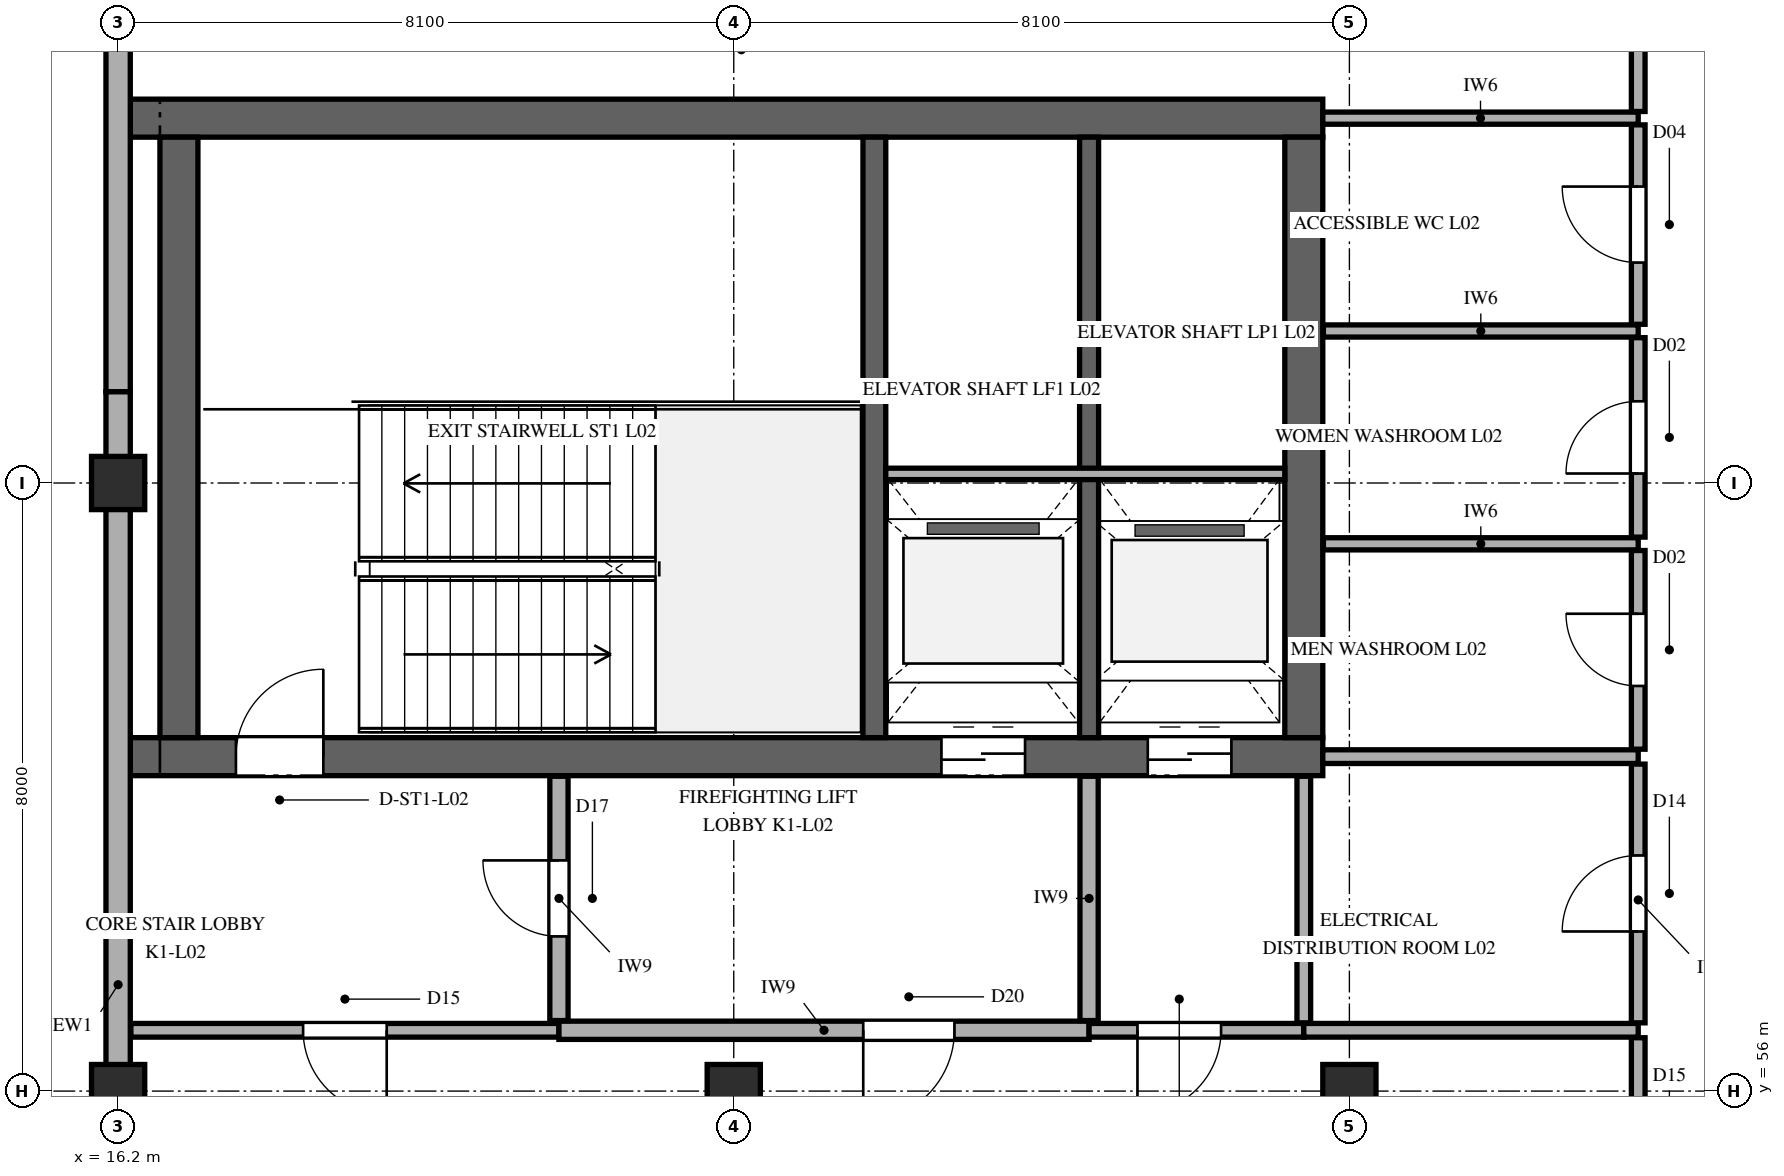
"""IFC4 building model, lengths in metres.
Left out: names, types, materials, properties, quantities, classifications, styles, units other than length and angle.
Written with IfcOpenShell. Run it as: python <this file> out.ifc"""

import sys

from ifc_helpers import new_model, si_unit, direction, frame, frame_2d, origin, origin_2d, place, context, subcontext, project, spatial, rectangle, extrude, element, fill, save


model = new_model("IFC4")
c1 = context("Model", 3, precision=1e-05, world=origin(), true_north=direction((0.0, 1.0)))
c2 = subcontext(c1, "Body", "Model", "MODEL_VIEW")
j1 = project(units=[si_unit("LENGTHUNIT", "METRE"), si_unit("PLANEANGLEUNIT", "RADIAN")], contexts=[c1])
p1 = place(None, origin())
s1 = spatial("IfcSite", under=j1, at=p1, CompositionType="ELEMENT")
p2 = place(p1, origin())
s2 = spatial("IfcBuilding", under=s1, at=p2, CompositionType="ELEMENT")
p3 = place(p2, frame((0.0, 0.0, 10.2)))
s3 = spatial("IfcBuildingStorey", under=s2, at=p3, CompositionType="ELEMENT", Elevation=10.2)
p4 = place(p3, frame((16.36, 60.4, 0.0), z_axis=(0.0, 0.0, 1.0), x_axis=(1.0, 0.0, 0.0)))
e1 = element("IfcWall", 1, at=p4, inside=s3, PredefinedType="SHEAR", context=c2, shape_type="SweptSolid", body=[
    extrude(rectangle(XDim=15.69, YDim=0.5, at=frame_2d((7.845, 0.0))), origin(), (0.0, 0.0, 1.0), 4.5),
])
p5 = place(p4, frame((1.39, 0.0, 0.0)))
e2 = element("IfcOpeningElement", 2, at=p5, cuts=e1, PredefinedType="OPENING", context=c2, shape_type="SweptSolid", body=[
    extrude(rectangle(XDim=1.15, YDim=2.25, at=frame_2d((0.575, 1.125))), frame((0.0, 0.26, 0.0), z_axis=(0.0, -1.0, 0.0), x_axis=(1.0, 0.0, 0.0)), (0.0, 0.0, 1.0), 0.52),
])
p6 = place(p4, frame((10.673, 0.0, 0.0)))
e3 = element("IfcOpeningElement", 3, at=p6, cuts=e1, PredefinedType="OPENING", context=c2, shape_type="SweptSolid", body=[
    extrude(rectangle(XDim=1.1, YDim=2.2, at=frame_2d((0.55, 1.1))), frame((0.0, 0.26, 0.0), z_axis=(0.0, -1.0, 0.0), x_axis=(1.0, 0.0, 0.0)), (0.0, 0.0, 1.0), 0.52),
])
p7 = place(p4, frame((13.387, 0.0, 0.0)))
e4 = element("IfcOpeningElement", 4, at=p7, cuts=e1, PredefinedType="OPENING", context=c2, shape_type="SweptSolid", body=[
    extrude(rectangle(XDim=1.1, YDim=2.2, at=frame_2d((0.55, 1.1))), frame((0.0, 0.26, 0.0), z_axis=(0.0, -1.0, 0.0), x_axis=(1.0, 0.0, 0.0)), (0.0, 0.0, 1.0), 0.52),
])
p8 = place(p3, frame((16.36, 68.8, 0.0), z_axis=(0.0, 0.0, 1.0), x_axis=(1.0, 0.0, 0.0)))
e5 = element("IfcWall", 5, at=p8, inside=s3, PredefinedType="SHEAR", context=c2, shape_type="SweptSolid", body=[
    extrude(rectangle(XDim=15.69, YDim=0.5, at=frame_2d((7.845, 0.0))), origin(), (0.0, 0.0, 1.0), 4.5),
])
for number, where, z_axis, x_axis in (
    (6, (17.0, 60.65, 0.0), (0.0, 0.0, 1.0), (0.0, 1.0, 0.0)),
    (7, (31.8, 60.65, 0.0), (0.0, 0.0, 1.0), (0.0, 1.0, 0.0)),
):
    element("IfcWall", number, at=place(p3, frame(where, z_axis=z_axis, x_axis=x_axis)), inside=s3, PredefinedType="SHEAR", context=c2, shape_type="SweptSolid", body=[
        extrude(rectangle(XDim=7.9, YDim=0.5, at=frame_2d((3.95, 0.0))), origin(), (0.0, 0.0, 1.0), 4.5),
    ])
p9 = place(p3, frame((26.15, 60.65, 0.0), z_axis=(0.0, 0.0, 1.0), x_axis=(0.0, 1.0, 0.0)))
e8 = element("IfcWall", 8, at=p9, inside=s3, PredefinedType="SHEAR", context=c2, shape_type="SweptSolid", body=[
    extrude(rectangle(XDim=7.9, YDim=0.3, at=frame_2d((3.95, 0.0))), origin(), (0.0, 0.0, 1.0), 4.5),
])
p10 = place(p3, frame((28.975, 60.65, 0.0), z_axis=(0.0, 0.0, 1.0), x_axis=(0.0, 1.0, 0.0)))
e9 = element("IfcWall", 9, at=p10, inside=s3, PredefinedType="SHEAR", context=c2, shape_type="SweptSolid", body=[
    extrude(rectangle(XDim=7.9, YDim=0.25, at=frame_2d((3.95, 0.0))), origin(), (0.0, 0.0, 1.0), 4.5),
])
for number, where, z_axis, x_axis in (
    (10, (16.2, 56.0, 0.0), (0.0, 0.0, 1.0), (1.0, 0.0, 0.0)),
    (11, (16.2, 64.0, 0.0), (0.0, 0.0, 1.0), (1.0, 0.0, 0.0)),
    (12, (24.3, 56.0, 0.0), (0.0, 0.0, 1.0), (1.0, 0.0, 0.0)),
    (13, (32.4, 56.0, 0.0), (0.0, 0.0, 1.0), (1.0, 0.0, 0.0)),
):
    element("IfcColumn", number, at=place(p3, frame(where, z_axis=z_axis, x_axis=x_axis)), inside=s3, PredefinedType="COLUMN", context=c2, shape_type="SweptSolid", body=[
        extrude(rectangle(XDim=0.7, YDim=0.7, at=origin_2d()), origin(), (0.0, 0.0, 1.0), 4.5),
    ])
p11 = place(p3, frame((16.2, 80.8, 0.0), z_axis=(0.0, 0.0, 1.0), x_axis=(0.0, -1.0, 0.0)))
e14 = element("IfcWall", 14, at=p11, inside=s3, PredefinedType="SOLIDWALL", context=c2, shape_type="SweptSolid", body=[
    extrude(rectangle(XDim=15.6, YDim=0.32, at=frame_2d((7.8, 0.0))), origin(), (0.0, 0.0, 1.0), 3.732),
])
p12 = place(p11, frame((4.5, 0.0, 0.95)))
e15 = element("IfcOpeningElement", 15, at=p12, cuts=e14, PredefinedType="OPENING", context=c2, shape_type="SweptSolid", body=[
    extrude(rectangle(XDim=1.8, YDim=1.8, at=frame_2d((0.9, 0.9))), frame((0.0, 0.17, 0.0), z_axis=(0.0, -1.0, 0.0), x_axis=(1.0, 0.0, 0.0)), (0.0, 0.0, 1.0), 0.34),
])
p13 = place(p3, frame((16.2, 65.2, 0.0), z_axis=(0.0, 0.0, 1.0), x_axis=(0.0, -1.0, 0.0)))
e16 = element("IfcWall", 16, at=p13, inside=s3, PredefinedType="SOLIDWALL", context=c2, shape_type="SweptSolid", body=[
    extrude(rectangle(XDim=15.6, YDim=0.32, at=frame_2d((7.8, 0.0))), origin(), (0.0, 0.0, 1.0), 3.732),
])
p14 = place(p3, frame((26.3, 64.12, 0.0), z_axis=(0.0, 0.0, 1.0), x_axis=(1.0, 0.0, 0.0)))
e17 = element("IfcWall", 17, at=p14, inside=s3, PredefinedType="PARTITIONING", context=c2, shape_type="SweptSolid", body=[
    extrude(rectangle(XDim=5.25, YDim=0.15, at=frame_2d((2.625, 0.0))), origin(), (0.0, 0.0, 1.0), 4.24),
])
p15 = place(p3, frame((16.368, 56.8, 0.0), z_axis=(0.0, 0.0, 1.0), x_axis=(1.0, 0.0, 0.0)))
e18 = element("IfcWall", 18, at=p15, inside=s3, PredefinedType="PARTITIONING", context=c2, shape_type="SweptSolid", body=[
    extrude(rectangle(XDim=5.632, YDim=0.18, at=frame_2d((2.816, 0.0))), origin(), (0.0, 0.0, 1.0), 4.24),
])
p16 = place(p15, frame((2.266, 0.0, 0.0)))
e19 = element("IfcOpeningElement", 19, at=p16, cuts=e18, PredefinedType="OPENING", context=c2, shape_type="SweptSolid", body=[
    extrude(rectangle(XDim=1.1, YDim=2.2, at=frame_2d((0.55, 1.1))), frame((0.0, 0.1, 0.0), z_axis=(0.0, -1.0, 0.0), x_axis=(1.0, 0.0, 0.0)), (0.0, 0.0, 1.0), 0.2),
])
p17 = place(p3, frame((22.0, 56.8, 0.0), z_axis=(0.0, 0.0, 1.0), x_axis=(1.0, 0.0, 0.0)))
e20 = element("IfcWall", 20, at=p17, inside=s3, PredefinedType="PARTITIONING", context=c2, shape_type="SweptSolid", body=[
    extrude(rectangle(XDim=6.975, YDim=0.24, at=frame_2d((3.488, 0.0))), origin(), (0.0, 0.0, 1.0), 4.24),
])
p18 = place(p17, frame((4.003, 0.0, 0.0)))
e21 = element("IfcOpeningElement", 21, at=p18, cuts=e20, PredefinedType="OPENING", context=c2, shape_type="SweptSolid", body=[
    extrude(rectangle(XDim=1.2, YDim=2.3, at=frame_2d((0.6, 1.15))), frame((0.0, 0.13, 0.0), z_axis=(0.0, -1.0, 0.0), x_axis=(1.0, 0.0, 0.0)), (0.0, 0.0, 1.0), 0.26),
])
p19 = place(p3, frame((28.975, 56.8, 0.0), z_axis=(0.0, 0.0, 1.0), x_axis=(1.0, 0.0, 0.0)))
e22 = element("IfcWall", 22, at=p19, inside=s3, PredefinedType="PARTITIONING", context=c2, shape_type="SweptSolid", body=[
    extrude(rectangle(XDim=2.825, YDim=0.18, at=frame_2d((1.413, 0.0))), origin(), (0.0, 0.0, 1.0), 4.24),
])
p20 = place(p19, frame((0.636, 0.0, 0.0)))
e23 = element("IfcOpeningElement", 23, at=p20, cuts=e22, PredefinedType="OPENING", context=c2, shape_type="SweptSolid", body=[
    extrude(rectangle(XDim=1.1, YDim=2.2, at=frame_2d((0.55, 1.1))), frame((0.0, 0.1, 0.0), z_axis=(0.0, -1.0, 0.0), x_axis=(1.0, 0.0, 0.0)), (0.0, 0.0, 1.0), 0.2),
])
p21 = place(p3, frame((31.8, 56.8, 0.0), z_axis=(0.0, 0.0, 1.0), x_axis=(1.0, 0.0, 0.0)))
e24 = element("IfcWall", 24, at=p21, inside=s3, PredefinedType="PARTITIONING", context=c2, shape_type="SweptSolid", body=[
    extrude(rectangle(XDim=4.4, YDim=0.18, at=frame_2d((2.2, 0.0))), origin(), (0.0, 0.0, 1.0), 4.24),
])
p22 = place(p3, frame((32.05, 60.4, 0.0), z_axis=(0.0, 0.0, 1.0), x_axis=(1.0, 0.0, 0.0)))
e25 = element("IfcWall", 25, at=p22, inside=s3, PredefinedType="PARTITIONING", context=c2, shape_type="SweptSolid", body=[
    extrude(rectangle(XDim=4.15, YDim=0.18, at=frame_2d((2.075, 0.0))), origin(), (0.0, 0.0, 1.0), 4.24),
])
for number, where, z_axis, x_axis in (
    (26, (32.058, 63.2, 0.0), (0.0, 0.0, 1.0), (1.0, 0.0, 0.0)),
    (27, (32.058, 66.0, 0.0), (0.0, 0.0, 1.0), (1.0, 0.0, 0.0)),
):
    element("IfcWall", number, at=place(p3, frame(where, z_axis=z_axis, x_axis=x_axis)), inside=s3, PredefinedType="PARTITIONING", context=c2, shape_type="SweptSolid", body=[
        extrude(rectangle(XDim=4.142, YDim=0.16, at=frame_2d((2.071, 0.0))), origin(), (0.0, 0.0, 1.0), 4.24),
    ])
p23 = place(p3, frame((32.05, 68.8, 0.0), z_axis=(0.0, 0.0, 1.0), x_axis=(1.0, 0.0, 0.0)))
e28 = element("IfcWall", 28, at=p23, inside=s3, PredefinedType="PARTITIONING", context=c2, shape_type="SweptSolid", body=[
    extrude(rectangle(XDim=4.15, YDim=0.16, at=frame_2d((2.075, 0.0))), origin(), (0.0, 0.0, 1.0), 4.24),
])
p24 = place(p3, frame((22.0, 56.928, 0.0), z_axis=(0.0, 0.0, 1.0), x_axis=(0.0, 1.0, 0.0)))
e29 = element("IfcWall", 29, at=p24, inside=s3, PredefinedType="PARTITIONING", context=c2, shape_type="SweptSolid", body=[
    extrude(rectangle(XDim=3.214, YDim=0.24, at=frame_2d((1.607, 0.0))), origin(), (0.0, 0.0, 1.0), 4.24),
])
p25 = place(p24, frame((1.107, 0.0, 0.0)))
e30 = element("IfcOpeningElement", 30, at=p25, cuts=e29, PredefinedType="OPENING", context=c2, shape_type="SweptSolid", body=[
    extrude(rectangle(XDim=1.0, YDim=2.2, at=frame_2d((0.5, 1.1))), frame((0.0, 0.13, 0.0), z_axis=(0.0, -1.0, 0.0), x_axis=(1.0, 0.0, 0.0)), (0.0, 0.0, 1.0), 0.26),
])
p26 = place(p3, frame((28.975, 56.928, 0.0), z_axis=(0.0, 0.0, 1.0), x_axis=(0.0, 1.0, 0.0)))
e31 = element("IfcWall", 31, at=p26, inside=s3, PredefinedType="PARTITIONING", context=c2, shape_type="SweptSolid", body=[
    extrude(rectangle(XDim=3.214, YDim=0.24, at=frame_2d((1.607, 0.0))), origin(), (0.0, 0.0, 1.0), 4.24),
])
p27 = place(p3, frame((31.8, 56.898, 0.0), z_axis=(0.0, 0.0, 1.0), x_axis=(0.0, 1.0, 0.0)))
e32 = element("IfcWall", 32, at=p27, inside=s3, PredefinedType="PARTITIONING", context=c2, shape_type="SweptSolid", body=[
    extrude(rectangle(XDim=3.244, YDim=0.18, at=frame_2d((1.622, 0.0))), origin(), (0.0, 0.0, 1.0), 4.24),
])
p28 = place(p3, frame((36.2, 53.298, 0.0), z_axis=(0.0, 0.0, 1.0), x_axis=(0.0, 1.0, 0.0)))
e33 = element("IfcWall", 33, at=p28, inside=s3, PredefinedType="PARTITIONING", context=c2, shape_type="SweptSolid", body=[
    extrude(rectangle(XDim=3.404, YDim=0.18, at=frame_2d((1.702, 0.0))), origin(), (0.0, 0.0, 1.0), 3.825),
])
p29 = place(p28, frame((1.152, 0.0, 0.0)))
e34 = element("IfcOpeningElement", 34, at=p29, cuts=e33, PredefinedType="OPENING", context=c2, shape_type="SweptSolid", body=[
    extrude(rectangle(XDim=1.1, YDim=2.2, at=frame_2d((0.55, 1.1))), frame((0.0, 0.1, 0.0), z_axis=(0.0, -1.0, 0.0), x_axis=(1.0, 0.0, 0.0)), (0.0, 0.0, 1.0), 0.2),
])
p30 = place(p3, frame((36.2, 56.898, 0.0), z_axis=(0.0, 0.0, 1.0), x_axis=(0.0, 1.0, 0.0)))
e35 = element("IfcWall", 35, at=p30, inside=s3, PredefinedType="PARTITIONING", context=c2, shape_type="SweptSolid", body=[
    extrude(rectangle(XDim=3.404, YDim=0.18, at=frame_2d((1.702, 0.0))), origin(), (0.0, 0.0, 1.0), 4.24),
])
p31 = place(p30, frame((1.202, 0.0, 0.0)))
e36 = element("IfcOpeningElement", 36, at=p31, cuts=e35, PredefinedType="OPENING", context=c2, shape_type="SweptSolid", body=[
    extrude(rectangle(XDim=1.0, YDim=2.15, at=frame_2d((0.5, 1.075))), frame((0.0, 0.1, 0.0), z_axis=(0.0, -1.0, 0.0), x_axis=(1.0, 0.0, 0.0)), (0.0, 0.0, 1.0), 0.2),
])
p32 = place(p3, frame((36.2, 60.498, 0.0), z_axis=(0.0, 0.0, 1.0), x_axis=(0.0, 1.0, 0.0)))
e37 = element("IfcWall", 37, at=p32, inside=s3, PredefinedType="PARTITIONING", context=c2, shape_type="SweptSolid", body=[
    extrude(rectangle(XDim=2.614, YDim=0.18, at=frame_2d((1.307, 0.0))), origin(), (0.0, 0.0, 1.0), 4.24),
])
p33 = place(p32, frame((0.832, 0.0, 0.0)))
e38 = element("IfcOpeningElement", 38, at=p33, cuts=e37, PredefinedType="OPENING", context=c2, shape_type="SweptSolid", body=[
    extrude(rectangle(XDim=0.95, YDim=2.1, at=frame_2d((0.475, 1.05))), frame((0.0, 0.1, 0.0), z_axis=(0.0, -1.0, 0.0), x_axis=(1.0, 0.0, 0.0)), (0.0, 0.0, 1.0), 0.2),
])
p34 = place(p3, frame((36.2, 63.288, 0.0), z_axis=(0.0, 0.0, 1.0), x_axis=(0.0, 1.0, 0.0)))
e39 = element("IfcWall", 39, at=p34, inside=s3, PredefinedType="PARTITIONING", context=c2, shape_type="SweptSolid", body=[
    extrude(rectangle(XDim=2.624, YDim=0.18, at=frame_2d((1.312, 0.0))), origin(), (0.0, 0.0, 1.0), 4.24),
])
p35 = place(p34, frame((0.837, 0.0, 0.0)))
e40 = element("IfcOpeningElement", 40, at=p35, cuts=e39, PredefinedType="OPENING", context=c2, shape_type="SweptSolid", body=[
    extrude(rectangle(XDim=0.95, YDim=2.1, at=frame_2d((0.475, 1.05))), frame((0.0, 0.1, 0.0), z_axis=(0.0, -1.0, 0.0), x_axis=(1.0, 0.0, 0.0)), (0.0, 0.0, 1.0), 0.2),
])
p36 = place(p3, frame((36.2, 66.088, 0.0), z_axis=(0.0, 0.0, 1.0), x_axis=(0.0, 1.0, 0.0)))
e41 = element("IfcWall", 41, at=p36, inside=s3, PredefinedType="PARTITIONING", context=c2, shape_type="SweptSolid", body=[
    extrude(rectangle(XDim=2.624, YDim=0.18, at=frame_2d((1.312, 0.0))), origin(), (0.0, 0.0, 1.0), 4.24),
])
p37 = place(p36, frame((0.812, 0.0, 0.0)))
e42 = element("IfcOpeningElement", 42, at=p37, cuts=e41, PredefinedType="OPENING", context=c2, shape_type="SweptSolid", body=[
    extrude(rectangle(XDim=1.0, YDim=2.15, at=frame_2d((0.5, 1.075))), frame((0.0, 0.1, 0.0), z_axis=(0.0, -1.0, 0.0), x_axis=(1.0, 0.0, 0.0)), (0.0, 0.0, 1.0), 0.2),
])
p38 = place(p3, frame((36.2, 68.888, 0.0), z_axis=(0.0, 0.0, 1.0), x_axis=(0.0, 1.0, 0.0)))
e43 = element("IfcWall", 43, at=p38, inside=s3, PredefinedType="PARTITIONING", context=c2, shape_type="SweptSolid", body=[
    extrude(rectangle(XDim=14.044, YDim=0.18, at=frame_2d((7.022, 0.0))), origin(), (0.0, 0.0, 1.0), 3.825),
])
p39 = place(p38, frame((6.522, 0.0, 0.0)))
e44 = element("IfcOpeningElement", 44, at=p39, cuts=e43, PredefinedType="OPENING", context=c2, shape_type="SweptSolid", body=[
    extrude(rectangle(XDim=1.0, YDim=2.2, at=frame_2d((0.5, 1.1))), frame((0.0, 0.1, 0.0), z_axis=(0.0, -1.0, 0.0), x_axis=(1.0, 0.0, 0.0)), (0.0, 0.0, 1.0), 0.2),
])
p40 = place(p5, origin())
e45 = element("IfcDoor", 45, at=p40, inside=s3, OperationType="SINGLE_SWING_RIGHT", PredefinedType="DOOR", context=c2, shape_type="SweptSolid", body=[
    extrude(rectangle(XDim=1.15, YDim=2.25, at=frame_2d((0.575, 1.125))), frame((0.0, 0.025, 0.0), z_axis=(0.0, -1.0, 0.0), x_axis=(1.0, 0.0, 0.0)), (0.0, 0.0, 1.0), 0.05),
])
fill(e2, e45)
p41 = place(p6, frame((1.1, 0.0, 0.0), z_axis=(0.0, 0.0, 1.0), x_axis=(-1.0, 0.0, 0.0)))
e46 = element("IfcDoor", 46, at=p41, inside=s3, OperationType="DOUBLE_DOOR_SLIDING", PredefinedType="DOOR", context=c2, shape_type="SweptSolid", body=[
    extrude(rectangle(XDim=1.1, YDim=2.2, at=frame_2d((0.55, 1.1))), frame((0.0, 0.025, 0.0), z_axis=(0.0, -1.0, 0.0), x_axis=(1.0, 0.0, 0.0)), (0.0, 0.0, 1.0), 0.05),
])
fill(e3, e46)
p42 = place(p7, frame((1.1, 0.0, 0.0), z_axis=(0.0, 0.0, 1.0), x_axis=(-1.0, 0.0, 0.0)))
e47 = element("IfcDoor", 47, at=p42, inside=s3, OperationType="DOUBLE_DOOR_SLIDING", PredefinedType="DOOR", context=c2, shape_type="SweptSolid", body=[
    extrude(rectangle(XDim=1.1, YDim=2.2, at=frame_2d((0.55, 1.1))), frame((0.0, 0.025, 0.0), z_axis=(0.0, -1.0, 0.0), x_axis=(1.0, 0.0, 0.0)), (0.0, 0.0, 1.0), 0.05),
])
fill(e4, e47)
p43 = place(p16, frame((1.1, 0.0, 0.0), z_axis=(0.0, 0.0, 1.0), x_axis=(-1.0, 0.0, 0.0)))
e48 = element("IfcDoor", 48, at=p43, inside=s3, OperationType="SINGLE_SWING_RIGHT", PredefinedType="DOOR", context=c2, shape_type="SweptSolid", body=[
    extrude(rectangle(XDim=1.1, YDim=2.2, at=frame_2d((0.55, 1.1))), frame((0.0, 0.025, 0.0), z_axis=(0.0, -1.0, 0.0), x_axis=(1.0, 0.0, 0.0)), (0.0, 0.0, 1.0), 0.05),
])
fill(e19, e48)
p44 = place(p18, frame((1.2, 0.0, 0.0), z_axis=(0.0, 0.0, 1.0), x_axis=(-1.0, 0.0, 0.0)))
e49 = element("IfcDoor", 49, at=p44, inside=s3, OperationType="SINGLE_SWING_LEFT", PredefinedType="DOOR", context=c2, shape_type="SweptSolid", body=[
    extrude(rectangle(XDim=1.2, YDim=2.3, at=frame_2d((0.6, 1.15))), frame((0.0, 0.025, 0.0), z_axis=(0.0, -1.0, 0.0), x_axis=(1.0, 0.0, 0.0)), (0.0, 0.0, 1.0), 0.05),
])
fill(e21, e49)
p45 = place(p20, frame((1.1, 0.0, 0.0), z_axis=(0.0, 0.0, 1.0), x_axis=(-1.0, 0.0, 0.0)))
e50 = element("IfcDoor", 50, at=p45, inside=s3, OperationType="SINGLE_SWING_LEFT", PredefinedType="DOOR", context=c2, shape_type="SweptSolid", body=[
    extrude(rectangle(XDim=1.1, YDim=2.2, at=frame_2d((0.55, 1.1))), frame((0.0, 0.025, 0.0), z_axis=(0.0, -1.0, 0.0), x_axis=(1.0, 0.0, 0.0)), (0.0, 0.0, 1.0), 0.05),
])
fill(e23, e50)
p46 = place(p25, origin())
e51 = element("IfcDoor", 51, at=p46, inside=s3, OperationType="SINGLE_SWING_RIGHT", PredefinedType="DOOR", context=c2, shape_type="SweptSolid", body=[
    extrude(rectangle(XDim=1.0, YDim=2.2, at=frame_2d((0.5, 1.1))), frame((0.0, 0.025, 0.0), z_axis=(0.0, -1.0, 0.0), x_axis=(1.0, 0.0, 0.0)), (0.0, 0.0, 1.0), 0.05),
])
fill(e30, e51)
p47 = place(p31, origin())
e52 = element("IfcDoor", 52, at=p47, inside=s3, OperationType="SINGLE_SWING_LEFT", PredefinedType="DOOR", context=c2, shape_type="SweptSolid", body=[
    extrude(rectangle(XDim=1.0, YDim=2.15, at=frame_2d((0.5, 1.075))), frame((0.0, 0.025, 0.0), z_axis=(0.0, -1.0, 0.0), x_axis=(1.0, 0.0, 0.0)), (0.0, 0.0, 1.0), 0.05),
])
fill(e36, e52)
p48 = place(p33, origin())
e53 = element("IfcDoor", 53, at=p48, inside=s3, OperationType="SINGLE_SWING_RIGHT", PredefinedType="DOOR", context=c2, shape_type="SweptSolid", body=[
    extrude(rectangle(XDim=0.95, YDim=2.1, at=frame_2d((0.475, 1.05))), frame((0.0, 0.025, 0.0), z_axis=(0.0, -1.0, 0.0), x_axis=(1.0, 0.0, 0.0)), (0.0, 0.0, 1.0), 0.05),
])
fill(e38, e53)
p49 = place(p35, origin())
e54 = element("IfcDoor", 54, at=p49, inside=s3, OperationType="SINGLE_SWING_LEFT", PredefinedType="DOOR", context=c2, shape_type="SweptSolid", body=[
    extrude(rectangle(XDim=0.95, YDim=2.1, at=frame_2d((0.475, 1.05))), frame((0.0, 0.025, 0.0), z_axis=(0.0, -1.0, 0.0), x_axis=(1.0, 0.0, 0.0)), (0.0, 0.0, 1.0), 0.05),
])
fill(e40, e54)
p50 = place(p37, origin())
e55 = element("IfcDoor", 55, at=p50, inside=s3, OperationType="SINGLE_SWING_RIGHT", PredefinedType="DOOR", context=c2, shape_type="SweptSolid", body=[
    extrude(rectangle(XDim=1.0, YDim=2.15, at=frame_2d((0.5, 1.075))), frame((0.0, 0.025, 0.0), z_axis=(0.0, -1.0, 0.0), x_axis=(1.0, 0.0, 0.0)), (0.0, 0.0, 1.0), 0.05),
])
fill(e42, e55)
save(model, sys.argv[1])
